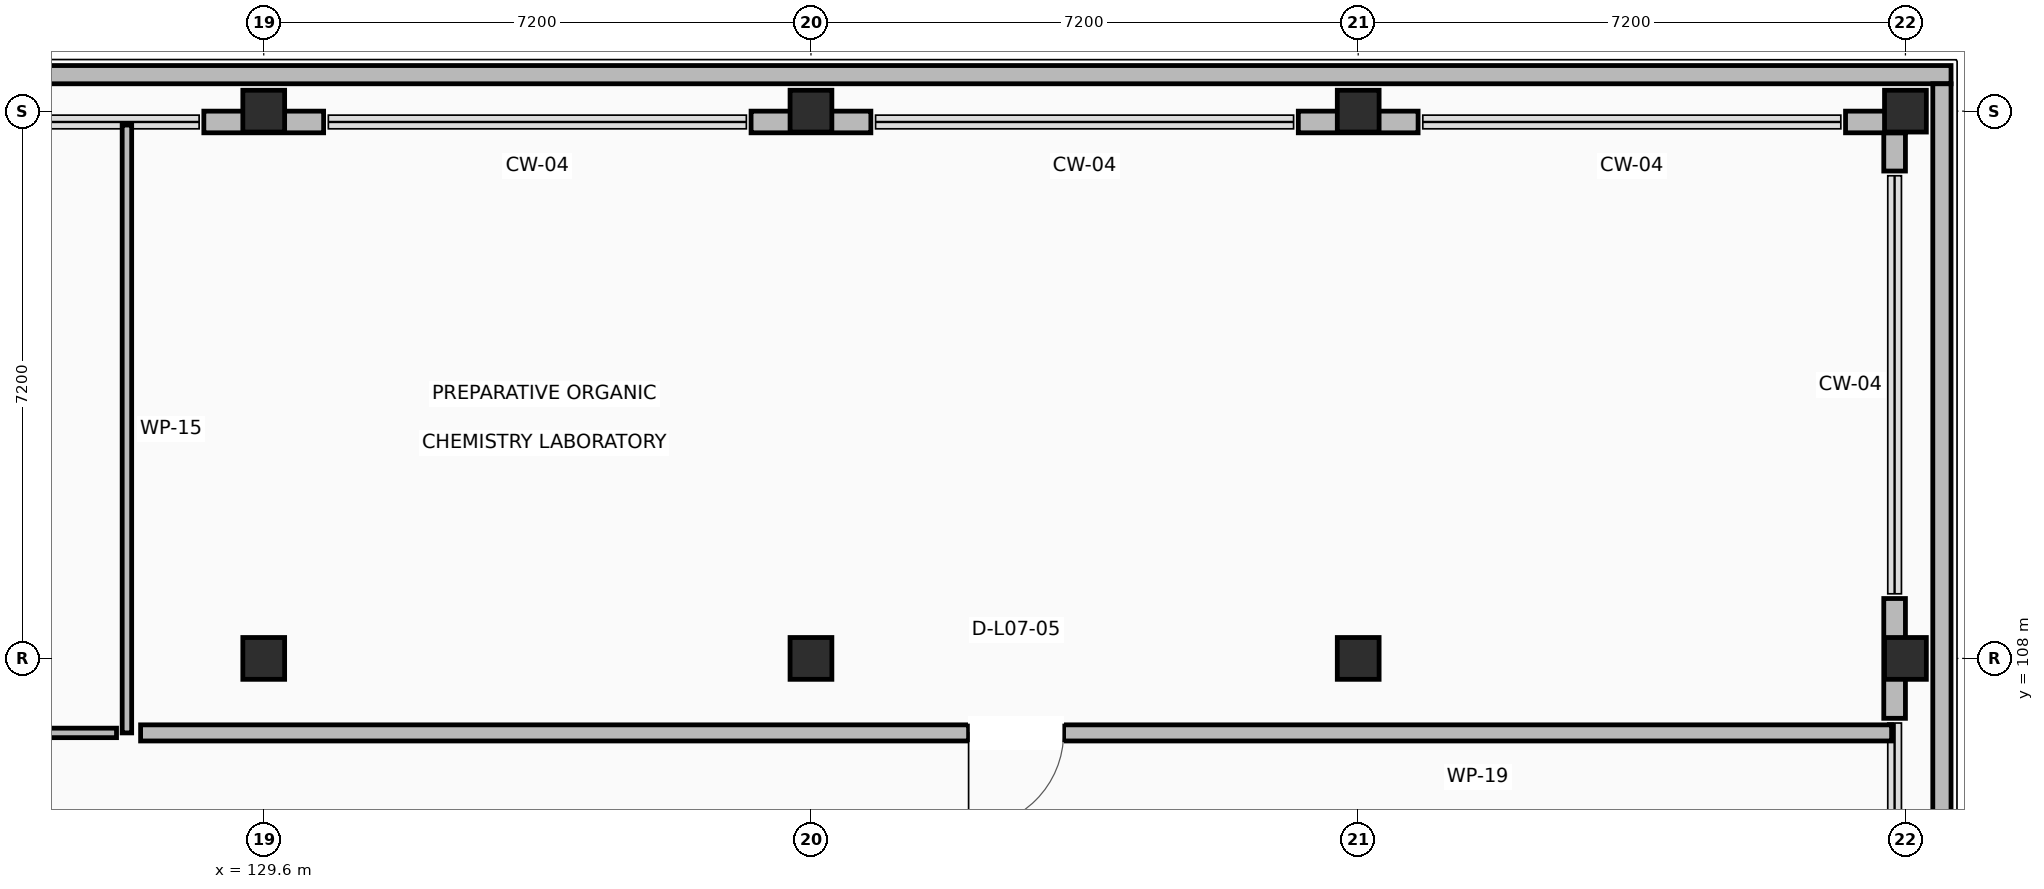
"""IFC4 building model, lengths in metres.
Left out: names, types, materials, properties, quantities, classifications, styles, units other than length and angle.
Written with IfcOpenShell. Run it as: python <this file> out.ifc"""

import sys

from ifc_helpers import new_model, si_unit, direction, frame, frame_2d, origin, origin_2d, place, context, subcontext, project, spatial, rectangle, extrude, element, fill, save


model = new_model("IFC4")
c1 = context("Model", 3, precision=1e-05, world=origin(), true_north=direction((0.0, 1.0)))
c2 = subcontext(c1, "Body", "Model", "MODEL_VIEW")
j1 = project(units=[si_unit("LENGTHUNIT", "METRE"), si_unit("PLANEANGLEUNIT", "RADIAN")], contexts=[c1])
p1 = place(None, origin())
s1 = spatial("IfcSite", under=j1, at=p1, CompositionType="ELEMENT")
p2 = place(p1, origin())
s2 = spatial("IfcBuilding", under=s1, at=p2, CompositionType="ELEMENT")
p3 = place(p2, frame((0.0, 0.0, 31.2)))
s3 = spatial("IfcBuildingStorey", under=s2, at=p3, CompositionType="ELEMENT", Elevation=31.2)
for number, where, z_axis, x_axis in (
    (1, (129.6, 108.0, 0.0), (0.0, 0.0, 1.0), (1.0, 0.0, 0.0)),
    (2, (129.6, 115.2, 0.0), (0.0, 0.0, 1.0), (1.0, 0.0, 0.0)),
    (3, (136.8, 108.0, 0.0), (0.0, 0.0, 1.0), (1.0, 0.0, 0.0)),
    (4, (136.8, 115.2, 0.0), (0.0, 0.0, 1.0), (1.0, 0.0, 0.0)),
    (5, (144.0, 108.0, 0.0), (0.0, 0.0, 1.0), (1.0, 0.0, 0.0)),
    (6, (144.0, 115.2, 0.0), (0.0, 0.0, 1.0), (1.0, 0.0, 0.0)),
    (7, (151.2, 108.0, 0.0), (0.0, 0.0, 1.0), (1.0, 0.0, 0.0)),
    (8, (151.2, 115.2, 0.0), (0.0, 0.0, 1.0), (1.0, 0.0, 0.0)),
):
    element("IfcColumn", number, at=place(p3, frame(where, z_axis=z_axis, x_axis=x_axis)), inside=s3, PredefinedType="COLUMN", context=c2, shape_type="SweptSolid", body=[
        extrude(rectangle(XDim=0.55, YDim=0.55, at=origin_2d()), origin(), (0.0, 0.0, 1.0), 3.92),
    ])
p4 = place(p3, frame((151.058, 107.212, 0.0), z_axis=(0.0, 0.0, 1.0), x_axis=(0.0, 1.0, 0.0)))
e9 = element("IfcWall", 9, at=p4, inside=s3, PredefinedType="STANDARD", context=c2, shape_type="SweptSolid", body=[
    extrude(rectangle(XDim=1.576, YDim=0.285, at=frame_2d((0.788, 0.0))), origin(), (0.0, 0.0, 1.0), 2.96),
])
p5 = place(p3, frame((151.058, 114.412, 0.0), z_axis=(0.0, 0.0, 1.0), x_axis=(0.0, 1.0, 0.0)))
e10 = element("IfcWall", 10, at=p5, inside=s3, PredefinedType="STANDARD", context=c2, shape_type="SweptSolid", body=[
    extrude(rectangle(XDim=0.503, YDim=0.285, at=frame_2d((0.251, 0.0))), origin(), (0.0, 0.0, 1.0), 2.96),
])
p6 = place(p3, frame((151.2, 115.058, 0.0), z_axis=(0.0, 0.0, 1.0), x_axis=(-1.0, 0.0, 0.0)))
e11 = element("IfcWall", 11, at=p6, inside=s3, PredefinedType="STANDARD", context=c2, shape_type="SweptSolid", body=[
    extrude(rectangle(XDim=0.788, YDim=0.285, at=frame_2d((0.394, 0.0))), origin(), (0.0, 0.0, 1.0), 2.96),
])
p7 = place(p3, frame((144.788, 115.058, 0.0), z_axis=(0.0, 0.0, 1.0), x_axis=(-1.0, 0.0, 0.0)))
e12 = element("IfcWall", 12, at=p7, inside=s3, PredefinedType="STANDARD", context=c2, shape_type="SweptSolid", body=[
    extrude(rectangle(XDim=1.576, YDim=0.285, at=frame_2d((0.788, 0.0))), origin(), (0.0, 0.0, 1.0), 2.96),
])
for number, where, z_axis, x_axis in (
    (13, (137.588, 115.058, 0.0), (0.0, 0.0, 1.0), (-1.0, 0.0, 0.0)),
    (14, (130.388, 115.058, 0.0), (0.0, 0.0, 1.0), (-1.0, 0.0, 0.0)),
):
    element("IfcWall", number, at=place(p3, frame(where, z_axis=z_axis, x_axis=x_axis)), inside=s3, PredefinedType="STANDARD", context=c2, shape_type="SweptSolid", body=[
        extrude(rectangle(XDim=1.576, YDim=0.285, at=frame_2d((0.788, 0.0))), origin(), (0.0, 0.0, 1.0), 2.96),
    ])
p8 = place(p3, frame((86.96, 115.68, 0.0), z_axis=(0.0, 0.0, 1.0), x_axis=(1.0, 0.0, 0.0)))
e15 = element("IfcWall", 15, at=p8, inside=s3, PredefinedType="PARAPET", context=c2, shape_type="SweptSolid", body=[
    extrude(rectangle(XDim=64.84, YDim=0.24, at=frame_2d((32.42, 0.0))), origin(), (0.0, 0.0, 1.0), 1.12),
])
p9 = place(p3, frame((151.68, 115.56, 0.0), z_axis=(0.0, 0.0, 1.0), x_axis=(0.0, -1.0, 0.0)))
e16 = element("IfcWall", 16, at=p9, inside=s3, PredefinedType="PARAPET", context=c2, shape_type="SweptSolid", body=[
    extrude(rectangle(XDim=21.36, YDim=0.24, at=frame_2d((10.68, 0.0))), origin(), (0.0, 0.0, 1.0), 1.12),
])
p10 = place(p3, frame((127.8, 115.017, 0.0), z_axis=(0.0, 0.0, 1.0), x_axis=(0.0, -1.0, 0.0)))
e17 = element("IfcWall", 17, at=p10, inside=s3, PredefinedType="PARTITIONING", context=c2, shape_type="SweptSolid", body=[
    extrude(rectangle(XDim=7.997, YDim=0.125, at=frame_2d((3.999, 0.0))), origin(), (0.0, 0.0, 1.0), 2.96),
])
p11 = place(p3, frame((127.663, 107.02, 0.0), z_axis=(0.0, 0.0, 1.0), x_axis=(-1.0, 0.0, 0.0)))
e18 = element("IfcWall", 18, at=p11, inside=s3, PredefinedType="PARTITIONING", context=c2, shape_type="SweptSolid", body=[
    extrude(rectangle(XDim=25.096, YDim=0.125, at=frame_2d((12.548, 0.0))), origin(), (0.0, 0.0, 1.0), 2.96),
])
p12 = place(p11, frame((13.138, 0.0, 0.0)))
e19 = element("IfcOpeningElement", 19, at=p12, cuts=e18, PredefinedType="OPENING", context=c2, shape_type="SweptSolid", body=[
    extrude(rectangle(XDim=0.92, YDim=2.1, at=frame_2d((0.46, 1.05))), frame((0.0, 0.073, 0.0), z_axis=(0.0, -1.0, 0.0), x_axis=(1.0, 0.0, 0.0)), (0.0, 0.0, 1.0), 0.145),
])
p13 = place(p3, frame((151.018, 107.02, 0.0), z_axis=(0.0, 0.0, 1.0), x_axis=(-1.0, 0.0, 0.0)))
e20 = element("IfcWall", 20, at=p13, inside=s3, PredefinedType="PARTITIONING", context=c2, shape_type="SweptSolid", body=[
    extrude(rectangle(XDim=23.038, YDim=0.212, at=frame_2d((11.519, 0.0))), origin(), (0.0, 0.0, 1.0), 2.96),
])
p14 = place(p13, frame((10.894, 0.0, 0.0)))
e21 = element("IfcOpeningElement", 21, at=p14, cuts=e20, PredefinedType="OPENING", context=c2, shape_type="SweptSolid", body=[
    extrude(rectangle(XDim=1.25, YDim=2.15, at=frame_2d((0.625, 1.075))), frame((0.0, 0.116, 0.0), z_axis=(0.0, -1.0, 0.0), x_axis=(1.0, 0.0, 0.0)), (0.0, 0.0, 1.0), 0.232),
])
p15 = place(p14, origin())
e22 = element("IfcDoor", 22, at=p15, inside=s3, OperationType="SINGLE_SWING_RIGHT", PredefinedType="DOOR", context=c2, shape_type="SweptSolid", body=[
    extrude(rectangle(XDim=1.25, YDim=2.15, at=frame_2d((0.625, 1.075))), frame((0.0, 0.025, 0.0), z_axis=(0.0, -1.0, 0.0), x_axis=(1.0, 0.0, 0.0)), (0.0, 0.0, 1.0), 0.05),
])
fill(e21, e22)
save(model, sys.argv[1])
